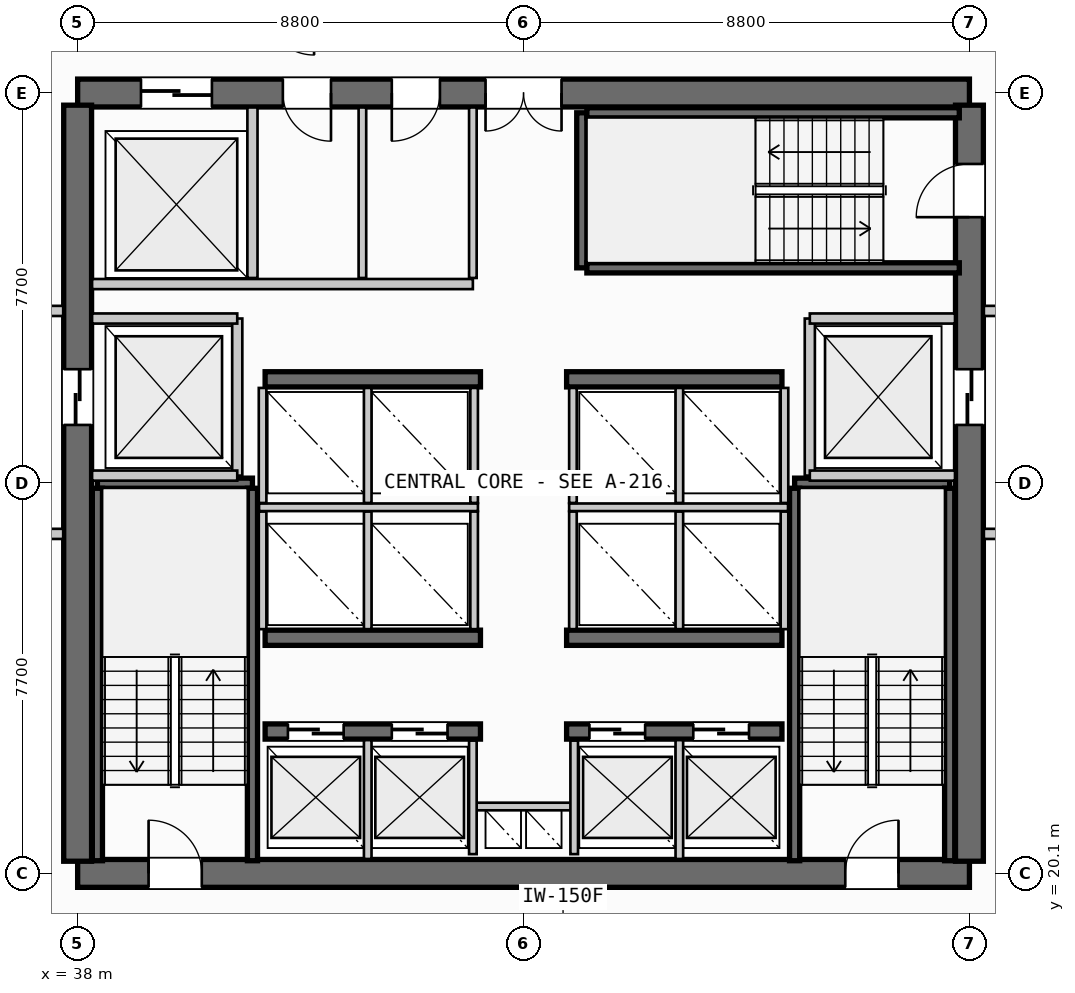
"""IFC4 building model, lengths in metres.
Left out: names, types, materials, properties, quantities, classifications, styles, units other than length and angle.
Written with IfcOpenShell. Run it as: python <this file> out.ifc"""

import sys

from ifc_helpers import new_model, si_unit, direction, frame, frame_2d, origin, place, context, subcontext, project, spatial, rectangle, extrude, source, transform, mapped, element, fill, save


model = new_model("IFC4")
c1 = context("Model", 3, precision=1e-05, world=origin(), true_north=direction((0.0, 1.0)))
c2 = subcontext(c1, "Body", "Model", "MODEL_VIEW")
j1 = project(units=[si_unit("LENGTHUNIT", "METRE"), si_unit("PLANEANGLEUNIT", "RADIAN")], contexts=[c1])
p1 = place(None, origin())
s1 = spatial("IfcSite", under=j1, at=p1, CompositionType="ELEMENT")
p2 = place(p1, origin())
s2 = spatial("IfcBuilding", under=s1, at=p2, CompositionType="ELEMENT")
p3 = place(p2, frame((0.0, 0.0, 114.4)))
s3 = spatial("IfcBuildingStorey", under=s2, at=p3, CompositionType="ELEMENT", Elevation=114.4)
p4 = place(p3, frame((38.0, 20.1, 0.0), z_axis=(0.0, 0.0, 1.0), x_axis=(1.0, 0.0, 0.0)))
e1 = element("IfcWall", 1, at=p4, inside=s3, PredefinedType="SHEAR", context=c2, shape_type="SweptSolid", body=[
    extrude(rectangle(XDim=17.6, YDim=0.55, at=frame_2d((8.8, 0.0))), origin(), (0.0, 0.0, 1.0), 3.35),
])
p5 = place(p4, frame((1.4, 0.0, 0.0)))
e2 = element("IfcOpeningElement", 2, at=p5, cuts=e1, PredefinedType="OPENING", context=c2, shape_type="SweptSolid", body=[
    extrude(rectangle(XDim=1.05, YDim=2.15, at=frame_2d((0.525, 1.075))), frame((0.0, 0.285, 0.0), z_axis=(0.0, -1.0, 0.0), x_axis=(1.0, 0.0, 0.0)), (0.0, 0.0, 1.0), 0.57),
])
p6 = place(p4, frame((15.15, 0.0, 0.0)))
e3 = element("IfcOpeningElement", 3, at=p6, cuts=e1, PredefinedType="OPENING", context=c2, shape_type="SweptSolid", body=[
    extrude(rectangle(XDim=1.05, YDim=2.15, at=frame_2d((0.525, 1.075))), frame((0.0, 0.285, 0.0), z_axis=(0.0, -1.0, 0.0), x_axis=(1.0, 0.0, 0.0)), (0.0, 0.0, 1.0), 0.57),
])
p7 = place(p3, frame((55.6, 35.5, 0.0), z_axis=(0.0, 0.0, 1.0), x_axis=(-1.0, 0.0, 0.0)))
e4 = element("IfcWall", 4, at=p7, inside=s3, PredefinedType="SHEAR", context=c2, shape_type="SweptSolid", body=[
    extrude(rectangle(XDim=17.6, YDim=0.55, at=frame_2d((8.8, 0.0))), origin(), (0.0, 0.0, 1.0), 3.35),
])
p8 = place(p7, frame((8.05, 0.0, 0.0)))
e5 = element("IfcOpeningElement", 5, at=p8, cuts=e4, PredefinedType="OPENING", context=c2, shape_type="SweptSolid", body=[
    extrude(rectangle(XDim=1.5, YDim=2.2, at=frame_2d((0.75, 1.1))), frame((0.0, 0.285, 0.0), z_axis=(0.0, -1.0, 0.0), x_axis=(1.0, 0.0, 0.0)), (0.0, 0.0, 1.0), 0.57),
])
p9 = place(p7, frame((14.95, 0.0, 0.0)))
e6 = element("IfcOpeningElement", 6, at=p9, cuts=e4, PredefinedType="OPENING", context=c2, shape_type="SweptSolid", body=[
    extrude(rectangle(XDim=1.4, YDim=2.3, at=frame_2d((0.7, 1.15))), frame((0.0, 0.285, 0.0), z_axis=(0.0, -1.0, 0.0), x_axis=(1.0, 0.0, 0.0)), (0.0, 0.0, 1.0), 0.57),
])
p10 = place(p7, frame((12.6, 0.0, 0.0)))
e7 = element("IfcOpeningElement", 7, at=p10, cuts=e4, PredefinedType="OPENING", context=c2, shape_type="SweptSolid", body=[
    extrude(rectangle(XDim=0.95, YDim=2.15, at=frame_2d((0.475, 1.075))), frame((0.0, 0.285, 0.0), z_axis=(0.0, -1.0, 0.0), x_axis=(1.0, 0.0, 0.0)), (0.0, 0.0, 1.0), 0.57),
])
p11 = place(p7, frame((10.45, 0.0, 0.0)))
e8 = element("IfcOpeningElement", 8, at=p11, cuts=e4, PredefinedType="OPENING", context=c2, shape_type="SweptSolid", body=[
    extrude(rectangle(XDim=0.95, YDim=2.15, at=frame_2d((0.475, 1.075))), frame((0.0, 0.285, 0.0), z_axis=(0.0, -1.0, 0.0), x_axis=(1.0, 0.0, 0.0)), (0.0, 0.0, 1.0), 0.57),
])
p12 = place(p3, frame((38.0, 35.26, 0.0), z_axis=(0.0, 0.0, 1.0), x_axis=(0.0, -1.0, 0.0)))
e9 = element("IfcWall", 9, at=p12, inside=s3, PredefinedType="SHEAR", context=c2, shape_type="SweptSolid", body=[
    extrude(rectangle(XDim=14.92, YDim=0.55, at=frame_2d((7.46, 0.0))), origin(), (0.0, 0.0, 1.0), 3.35),
])
p13 = place(p12, frame((5.21, 0.0, 0.0)))
e10 = element("IfcOpeningElement", 10, at=p13, cuts=e9, PredefinedType="OPENING", context=c2, shape_type="SweptSolid", body=[
    extrude(rectangle(XDim=1.1, YDim=2.2, at=frame_2d((0.55, 1.1))), frame((0.0, 0.285, 0.0), z_axis=(0.0, -1.0, 0.0), x_axis=(1.0, 0.0, 0.0)), (0.0, 0.0, 1.0), 0.57),
])
p14 = place(p3, frame((55.6, 20.34, 0.0), z_axis=(0.0, 0.0, 1.0), x_axis=(0.0, 1.0, 0.0)))
e11 = element("IfcWall", 11, at=p14, inside=s3, PredefinedType="SHEAR", context=c2, shape_type="SweptSolid", body=[
    extrude(rectangle(XDim=14.92, YDim=0.55, at=frame_2d((7.46, 0.0))), origin(), (0.0, 0.0, 1.0), 3.35),
])
p15 = place(p14, frame((12.71, 0.0, 0.0)))
e12 = element("IfcOpeningElement", 12, at=p15, cuts=e11, PredefinedType="OPENING", context=c2, shape_type="SweptSolid", body=[
    extrude(rectangle(XDim=1.05, YDim=2.15, at=frame_2d((0.525, 1.075))), frame((0.0, 0.285, 0.0), z_axis=(0.0, -1.0, 0.0), x_axis=(1.0, 0.0, 0.0)), (0.0, 0.0, 1.0), 0.57),
])
p16 = place(p14, frame((8.61, 0.0, 0.0)))
e13 = element("IfcOpeningElement", 13, at=p16, cuts=e11, PredefinedType="OPENING", context=c2, shape_type="SweptSolid", body=[
    extrude(rectangle(XDim=1.1, YDim=2.2, at=frame_2d((0.55, 1.1))), frame((0.0, 0.285, 0.0), z_axis=(0.0, -1.0, 0.0), x_axis=(1.0, 0.0, 0.0)), (0.0, 0.0, 1.0), 0.57),
])
p17 = place(p3, frame((41.7, 22.9, 0.0), z_axis=(0.0, 0.0, 1.0), x_axis=(1.0, 0.0, 0.0)))
e14 = element("IfcWall", 14, at=p17, inside=s3, PredefinedType="SHEAR", context=c2, shape_type="SweptSolid", body=[
    extrude(rectangle(XDim=4.25, YDim=0.3, at=frame_2d((2.125, 0.0))), origin(), (0.0, 0.0, 1.0), 3.35),
])
p18 = place(p17, frame((0.45, 0.0, 0.0)))
e15 = element("IfcOpeningElement", 15, at=p18, cuts=e14, PredefinedType="OPENING", context=c2, shape_type="SweptSolid", body=[
    extrude(rectangle(XDim=1.1, YDim=2.2, at=frame_2d((0.55, 1.1))), frame((0.0, 0.16, 0.0), z_axis=(0.0, -1.0, 0.0), x_axis=(1.0, 0.0, 0.0)), (0.0, 0.0, 1.0), 0.32),
])
p19 = place(p17, frame((2.5, 0.0, 0.0)))
e16 = element("IfcOpeningElement", 16, at=p19, cuts=e14, PredefinedType="OPENING", context=c2, shape_type="SweptSolid", body=[
    extrude(rectangle(XDim=1.1, YDim=2.2, at=frame_2d((0.55, 1.1))), frame((0.0, 0.16, 0.0), z_axis=(0.0, -1.0, 0.0), x_axis=(1.0, 0.0, 0.0)), (0.0, 0.0, 1.0), 0.32),
])
p20 = place(p3, frame((47.65, 22.9, 0.0), z_axis=(0.0, 0.0, 1.0), x_axis=(1.0, 0.0, 0.0)))
e17 = element("IfcWall", 17, at=p20, inside=s3, PredefinedType="SHEAR", context=c2, shape_type="SweptSolid", body=[
    extrude(rectangle(XDim=4.25, YDim=0.3, at=frame_2d((2.125, 0.0))), origin(), (0.0, 0.0, 1.0), 3.35),
])
p21 = place(p20, frame((0.45, 0.0, 0.0)))
e18 = element("IfcOpeningElement", 18, at=p21, cuts=e17, PredefinedType="OPENING", context=c2, shape_type="SweptSolid", body=[
    extrude(rectangle(XDim=1.1, YDim=2.2, at=frame_2d((0.55, 1.1))), frame((0.0, 0.16, 0.0), z_axis=(0.0, -1.0, 0.0), x_axis=(1.0, 0.0, 0.0)), (0.0, 0.0, 1.0), 0.32),
])
p22 = place(p20, frame((2.5, 0.0, 0.0)))
e19 = element("IfcOpeningElement", 19, at=p22, cuts=e17, PredefinedType="OPENING", context=c2, shape_type="SweptSolid", body=[
    extrude(rectangle(XDim=1.1, YDim=2.2, at=frame_2d((0.55, 1.1))), frame((0.0, 0.16, 0.0), z_axis=(0.0, -1.0, 0.0), x_axis=(1.0, 0.0, 0.0)), (0.0, 0.0, 1.0), 0.32),
])
for number, where, z_axis, x_axis in (
    (20, (41.7, 24.75, 0.0), (0.0, 0.0, 1.0), (1.0, 0.0, 0.0)),
    (21, (47.65, 24.75, 0.0), (0.0, 0.0, 1.0), (1.0, 0.0, 0.0)),
    (22, (41.7, 29.85, 0.0), (0.0, 0.0, 1.0), (1.0, 0.0, 0.0)),
    (23, (47.65, 29.85, 0.0), (0.0, 0.0, 1.0), (1.0, 0.0, 0.0)),
):
    element("IfcWall", number, at=place(p3, frame(where, z_axis=z_axis, x_axis=x_axis)), inside=s3, PredefinedType="SHEAR", context=c2, shape_type="SweptSolid", body=[
        extrude(rectangle(XDim=4.25, YDim=0.3, at=frame_2d((2.125, 0.0))), origin(), (0.0, 0.0, 1.0), 3.35),
    ])
p23 = place(p3, frame((38.39, 27.8, 0.0), z_axis=(0.0, 0.0, 1.0), x_axis=(1.0, 0.0, 0.0)))
e24 = element("IfcWall", 24, at=p23, inside=s3, PredefinedType="SHEAR", context=c2, shape_type="SweptSolid", body=[
    extrude(rectangle(XDim=3.06, YDim=0.2, at=frame_2d((1.53, 0.0))), origin(), (0.0, 0.0, 1.0), 3.35),
])
for number, where, z_axis, x_axis in (
    (25, (41.45, 27.7, 0.0), (0.0, 0.0, 1.0), (0.0, -1.0, 0.0)),
    (26, (38.39, 20.35, 0.0), (0.0, 0.0, 1.0), (0.0, 1.0, 0.0)),
):
    element("IfcWall", number, at=place(p3, frame(where, z_axis=z_axis, x_axis=x_axis)), inside=s3, PredefinedType="SHEAR", context=c2, shape_type="SweptSolid", body=[
        extrude(rectangle(XDim=7.35, YDim=0.2, at=frame_2d((3.675, 0.0))), origin(), (0.0, 0.0, 1.0), 3.35),
    ])
p24 = place(p3, frame((52.15, 27.8, 0.0), z_axis=(0.0, 0.0, 1.0), x_axis=(1.0, 0.0, 0.0)))
e27 = element("IfcWall", 27, at=p24, inside=s3, PredefinedType="SHEAR", context=c2, shape_type="SweptSolid", body=[
    extrude(rectangle(XDim=3.06, YDim=0.2, at=frame_2d((1.53, 0.0))), origin(), (0.0, 0.0, 1.0), 3.35),
])
for number, where, z_axis, x_axis in (
    (28, (55.21, 27.7, 0.0), (0.0, 0.0, 1.0), (0.0, -1.0, 0.0)),
    (29, (52.15, 20.35, 0.0), (0.0, 0.0, 1.0), (0.0, 1.0, 0.0)),
):
    element("IfcWall", number, at=place(p3, frame(where, z_axis=z_axis, x_axis=x_axis)), inside=s3, PredefinedType="SHEAR", context=c2, shape_type="SweptSolid", body=[
        extrude(rectangle(XDim=7.35, YDim=0.2, at=frame_2d((3.675, 0.0))), origin(), (0.0, 0.0, 1.0), 3.35),
    ])
p25 = place(p3, frame((47.95, 32.05, 0.0), z_axis=(0.0, 0.0, 1.0), x_axis=(0.0, 1.0, 0.0)))
e30 = element("IfcWall", 30, at=p25, inside=s3, PredefinedType="SHEAR", context=c2, shape_type="SweptSolid", body=[
    extrude(rectangle(XDim=3.06, YDim=0.2, at=frame_2d((1.53, 0.0))), origin(), (0.0, 0.0, 1.0), 3.35),
])
for number, where, z_axis, x_axis in (
    (31, (48.05, 35.11, 0.0), (0.0, 0.0, 1.0), (1.0, 0.0, 0.0)),
    (32, (55.4, 32.05, 0.0), (0.0, 0.0, 1.0), (-1.0, 0.0, 0.0)),
):
    element("IfcWall", number, at=place(p3, frame(where, z_axis=z_axis, x_axis=x_axis)), inside=s3, PredefinedType="SHEAR", context=c2, shape_type="SweptSolid", body=[
        extrude(rectangle(XDim=7.35, YDim=0.2, at=frame_2d((3.675, 0.0))), origin(), (0.0, 0.0, 1.0), 3.35),
    ])
p26 = place(p3, frame((45.8, 21.42, 0.0), z_axis=(0.0, 0.0, 1.0), x_axis=(1.0, 0.0, 0.0)))
e33 = element("IfcWall", 33, at=p26, inside=s3, PredefinedType="PARTITIONING", context=c2, shape_type="SweptSolid", body=[
    extrude(rectangle(XDim=2.0, YDim=0.15, at=frame_2d((1.0, 0.0))), origin(), (0.0, 0.0, 1.0), 2.28),
])
for number, where, z_axis, x_axis in (
    (34, (45.8, 20.48, 0.0), (0.0, 0.0, 1.0), (0.0, 1.0, 0.0)),
    (35, (47.8, 20.48, 0.0), (0.0, 0.0, 1.0), (0.0, 1.0, 0.0)),
):
    element("IfcWall", number, at=place(p3, frame(where, z_axis=z_axis, x_axis=x_axis)), inside=s3, PredefinedType="PARTITIONING", context=c2, shape_type="SweptSolid", body=[
        extrude(rectangle(XDim=2.24, YDim=0.15, at=frame_2d((1.12, 0.0))), origin(), (0.0, 0.0, 1.0), 2.28),
    ])
p27 = place(p3, frame((41.15, 27.95, 0.0), z_axis=(0.0, 0.0, 1.0), x_axis=(0.0, 1.0, 0.0)))
e36 = element("IfcWall", 36, at=p27, inside=s3, PredefinedType="PARTITIONING", context=c2, shape_type="SweptSolid", body=[
    extrude(rectangle(XDim=3.1, YDim=0.2, at=frame_2d((1.55, 0.0))), origin(), (0.0, 0.0, 1.0), 2.28),
])
for number, where, z_axis, x_axis in (
    (37, (38.285, 27.95, 0.0), (0.0, 0.0, 1.0), (1.0, 0.0, 0.0)),
    (38, (38.285, 31.05, 0.0), (0.0, 0.0, 1.0), (1.0, 0.0, 0.0)),
):
    element("IfcWall", number, at=place(p3, frame(where, z_axis=z_axis, x_axis=x_axis)), inside=s3, PredefinedType="PARTITIONING", context=c2, shape_type="SweptSolid", body=[
        extrude(rectangle(XDim=2.865, YDim=0.2, at=frame_2d((1.433, 0.0))), origin(), (0.0, 0.0, 1.0), 2.28),
    ])
for number, where, z_axis, x_axis in (
    (39, (34.5, 26.8, 0.0), (0.0, 0.0, 1.0), (1.0, 0.0, 0.0)),
    (40, (34.5, 31.2, 0.0), (0.0, 0.0, 1.0), (1.0, 0.0, 0.0)),
):
    element("IfcWall", number, at=place(p3, frame(where, z_axis=z_axis, x_axis=x_axis)), inside=s3, PredefinedType="PARTITIONING", context=c2, shape_type="SweptSolid", body=[
        extrude(rectangle(XDim=3.215, YDim=0.2, at=frame_2d((1.607, 0.0))), origin(), (0.0, 0.0, 1.0), 2.28),
    ])
p28 = place(p3, frame((52.45, 27.95, 0.0), z_axis=(0.0, 0.0, 1.0), x_axis=(0.0, 1.0, 0.0)))
e41 = element("IfcWall", 41, at=p28, inside=s3, PredefinedType="PARTITIONING", context=c2, shape_type="SweptSolid", body=[
    extrude(rectangle(XDim=3.1, YDim=0.2, at=frame_2d((1.55, 0.0))), origin(), (0.0, 0.0, 1.0), 2.28),
])
for number, where, z_axis, x_axis in (
    (42, (52.45, 27.95, 0.0), (0.0, 0.0, 1.0), (1.0, 0.0, 0.0)),
    (43, (52.45, 31.05, 0.0), (0.0, 0.0, 1.0), (1.0, 0.0, 0.0)),
):
    element("IfcWall", number, at=place(p3, frame(where, z_axis=z_axis, x_axis=x_axis)), inside=s3, PredefinedType="PARTITIONING", context=c2, shape_type="SweptSolid", body=[
        extrude(rectangle(XDim=2.865, YDim=0.2, at=frame_2d((1.433, 0.0))), origin(), (0.0, 0.0, 1.0), 2.28),
    ])
for number, where, z_axis, x_axis in (
    (44, (55.885, 26.8, 0.0), (0.0, 0.0, 1.0), (1.0, 0.0, 0.0)),
    (45, (55.885, 31.2, 0.0), (0.0, 0.0, 1.0), (1.0, 0.0, 0.0)),
):
    element("IfcWall", number, at=place(p3, frame(where, z_axis=z_axis, x_axis=x_axis)), inside=s3, PredefinedType="PARTITIONING", context=c2, shape_type="SweptSolid", body=[
        extrude(rectangle(XDim=3.215, YDim=0.2, at=frame_2d((1.607, 0.0))), origin(), (0.0, 0.0, 1.0), 2.28),
    ])
for number, where, z_axis, x_axis in (
    (46, (43.725, 20.385, 0.0), (0.0, 0.0, 1.0), (0.0, 1.0, 0.0)),
    (47, (49.875, 20.385, 0.0), (0.0, 0.0, 1.0), (0.0, 1.0, 0.0)),
):
    element("IfcWall", number, at=place(p3, frame(where, z_axis=z_axis, x_axis=x_axis)), inside=s3, PredefinedType="PARTITIONING", context=c2, shape_type="SweptSolid", body=[
        extrude(rectangle(XDim=2.345, YDim=0.15, at=frame_2d((1.172, 0.0))), origin(), (0.0, 0.0, 1.0), 2.28),
    ])
p29 = place(p3, frame((41.58, 27.325, 0.0), z_axis=(0.0, 0.0, 1.0), x_axis=(1.0, 0.0, 0.0)))
e48 = element("IfcWall", 48, at=p29, inside=s3, PredefinedType="PARTITIONING", context=c2, shape_type="SweptSolid", body=[
    extrude(rectangle(XDim=4.32, YDim=0.15, at=frame_2d((2.16, 0.0))), origin(), (0.0, 0.0, 1.0), 2.28),
])
p30 = place(p3, frame((47.7, 27.325, 0.0), z_axis=(0.0, 0.0, 1.0), x_axis=(1.0, 0.0, 0.0)))
e49 = element("IfcWall", 49, at=p30, inside=s3, PredefinedType="PARTITIONING", context=c2, shape_type="SweptSolid", body=[
    extrude(rectangle(XDim=4.32, YDim=0.15, at=frame_2d((2.16, 0.0))), origin(), (0.0, 0.0, 1.0), 2.28),
])
for number, where, z_axis, x_axis in (
    (50, (41.65, 24.92, 0.0), (0.0, 0.0, 1.0), (0.0, 1.0, 0.0)),
    (51, (43.725, 24.92, 0.0), (0.0, 0.0, 1.0), (0.0, 1.0, 0.0)),
    (52, (45.825, 24.92, 0.0), (0.0, 0.0, 1.0), (0.0, 1.0, 0.0)),
    (53, (47.775, 24.92, 0.0), (0.0, 0.0, 1.0), (0.0, 1.0, 0.0)),
    (54, (49.875, 24.92, 0.0), (0.0, 0.0, 1.0), (0.0, 1.0, 0.0)),
    (55, (51.95, 24.92, 0.0), (0.0, 0.0, 1.0), (0.0, 1.0, 0.0)),
):
    element("IfcWall", number, at=place(p3, frame(where, z_axis=z_axis, x_axis=x_axis)), inside=s3, PredefinedType="PARTITIONING", context=c2, shape_type="SweptSolid", body=[
        extrude(rectangle(XDim=2.32, YDim=0.15, at=frame_2d((1.16, 0.0))), origin(), (0.0, 0.0, 1.0), 2.28),
    ])
for number, where, z_axis, x_axis in (
    (56, (41.65, 27.41, 0.0), (0.0, 0.0, 1.0), (0.0, 1.0, 0.0)),
    (57, (43.725, 27.41, 0.0), (0.0, 0.0, 1.0), (0.0, 1.0, 0.0)),
    (58, (45.825, 27.41, 0.0), (0.0, 0.0, 1.0), (0.0, 1.0, 0.0)),
    (59, (47.775, 27.41, 0.0), (0.0, 0.0, 1.0), (0.0, 1.0, 0.0)),
    (60, (49.875, 27.41, 0.0), (0.0, 0.0, 1.0), (0.0, 1.0, 0.0)),
    (61, (51.95, 27.41, 0.0), (0.0, 0.0, 1.0), (0.0, 1.0, 0.0)),
):
    element("IfcWall", number, at=place(p3, frame(where, z_axis=z_axis, x_axis=x_axis)), inside=s3, PredefinedType="PARTITIONING", context=c2, shape_type="SweptSolid", body=[
        extrude(rectangle(XDim=2.27, YDim=0.15, at=frame_2d((1.135, 0.0))), origin(), (0.0, 0.0, 1.0), 2.28),
    ])
p31 = place(p3, frame((41.45, 31.85, 0.0), z_axis=(0.0, 0.0, 1.0), x_axis=(0.0, 1.0, 0.0)))
e62 = element("IfcWall", 62, at=p31, inside=s3, PredefinedType="PARTITIONING", context=c2, shape_type="SweptSolid", body=[
    extrude(rectangle(XDim=3.365, YDim=0.2, at=frame_2d((1.683, 0.0))), origin(), (0.0, 0.0, 1.0), 2.28),
])
p32 = place(p3, frame((38.285, 31.73, 0.0), z_axis=(0.0, 0.0, 1.0), x_axis=(1.0, 0.0, 0.0)))
e63 = element("IfcWall", 63, at=p32, inside=s3, PredefinedType="PARTITIONING", context=c2, shape_type="SweptSolid", body=[
    extrude(rectangle(XDim=7.515, YDim=0.2, at=frame_2d((3.758, 0.0))), origin(), (0.0, 0.0, 1.0), 2.28),
])
p33 = place(p3, frame((45.8, 31.85, 0.0), z_axis=(0.0, 0.0, 1.0), x_axis=(0.0, 1.0, 0.0)))
e64 = element("IfcWall", 64, at=p33, inside=s3, PredefinedType="PARTITIONING", context=c2, shape_type="SweptSolid", body=[
    extrude(rectangle(XDim=3.365, YDim=0.15, at=frame_2d((1.683, 0.0))), origin(), (0.0, 0.0, 1.0), 2.28),
])
p34 = place(p3, frame((43.62, 31.85, 0.0), z_axis=(0.0, 0.0, 1.0), x_axis=(0.0, 1.0, 0.0)))
e65 = element("IfcWall", 65, at=p34, inside=s3, PredefinedType="PLUMBINGWALL", context=c2, shape_type="SweptSolid", body=[
    extrude(rectangle(XDim=3.365, YDim=0.15, at=frame_2d((1.683, 0.0))), origin(), (0.0, 0.0, 1.0), 2.28),
])
m1 = source(origin(), c2, "Body", "SweptSolid", [
    extrude(rectangle(XDim=1.05, YDim=2.15, at=frame_2d((0.525, 1.075))), frame((0.0, 0.025, 0.0), z_axis=(0.0, -1.0, 0.0), x_axis=(1.0, 0.0, 0.0)), (0.0, 0.0, 1.0), 0.05),
])
p35 = place(p5, origin())
e66 = element("IfcDoor", 66, at=p35, inside=s3, OperationType="SINGLE_SWING_LEFT", PredefinedType="DOOR", context=c2, shape_type="MappedRepresentation", body=[
    mapped(m1, transform((0.0, 0.0, 0.0), scale=1.0)),
])
fill(e2, e66)
p36 = place(p6, origin())
e67 = element("IfcDoor", 67, at=p36, inside=s3, OperationType="SINGLE_SWING_RIGHT", PredefinedType="DOOR", context=c2, shape_type="MappedRepresentation", body=[
    mapped(m1, transform((0.0, 0.0, 0.0), scale=1.0)),
])
fill(e3, e67)
p37 = place(p15, origin())
e68 = element("IfcDoor", 68, at=p37, inside=s3, OperationType="SINGLE_SWING_LEFT", PredefinedType="DOOR", context=c2, shape_type="MappedRepresentation", body=[
    mapped(m1, transform((0.0, 0.0, 0.0), scale=1.0)),
])
fill(e12, e68)
m2 = source(origin(), c2, "Body", "SweptSolid", [
    extrude(rectangle(XDim=1.5, YDim=2.2, at=frame_2d((0.75, 1.1))), frame((0.0, 0.025, 0.0), z_axis=(0.0, -1.0, 0.0), x_axis=(1.0, 0.0, 0.0)), (0.0, 0.0, 1.0), 0.05),
])
p38 = place(p8, origin())
e69 = element("IfcDoor", 69, at=p38, inside=s3, OperationType="DOUBLE_DOOR_SINGLE_SWING", PredefinedType="DOOR", context=c2, shape_type="MappedRepresentation", body=[
    mapped(m2, transform((0.0, 0.0, 0.0), scale=1.0)),
])
fill(e5, e69)
m3 = source(origin(), c2, "Body", "SweptSolid", [
    extrude(rectangle(XDim=1.1, YDim=2.2, at=frame_2d((0.55, 1.1))), frame((0.0, 0.025, 0.0), z_axis=(0.0, -1.0, 0.0), x_axis=(1.0, 0.0, 0.0)), (0.0, 0.0, 1.0), 0.05),
])
p39 = place(p13, origin())
e70 = element("IfcDoor", 70, at=p39, inside=s3, OperationType="SLIDING_TO_LEFT", PredefinedType="DOOR", context=c2, shape_type="MappedRepresentation", body=[
    mapped(m3, transform((0.0, 0.0, 0.0), scale=1.0)),
])
fill(e10, e70)
p40 = place(p16, origin())
e71 = element("IfcDoor", 71, at=p40, inside=s3, OperationType="SLIDING_TO_RIGHT", PredefinedType="DOOR", context=c2, shape_type="MappedRepresentation", body=[
    mapped(m3, transform((0.0, 0.0, 0.0), scale=1.0)),
])
fill(e13, e71)
p41 = place(p18, origin())
e72 = element("IfcDoor", 72, at=p41, inside=s3, OperationType="SLIDING_TO_LEFT", PredefinedType="DOOR", context=c2, shape_type="MappedRepresentation", body=[
    mapped(m3, transform((0.0, 0.0, 0.0), scale=1.0)),
])
fill(e15, e72)
p42 = place(p19, origin())
e73 = element("IfcDoor", 73, at=p42, inside=s3, OperationType="SLIDING_TO_LEFT", PredefinedType="DOOR", context=c2, shape_type="MappedRepresentation", body=[
    mapped(m3, transform((0.0, 0.0, 0.0), scale=1.0)),
])
fill(e16, e73)
p43 = place(p21, origin())
e74 = element("IfcDoor", 74, at=p43, inside=s3, OperationType="SLIDING_TO_LEFT", PredefinedType="DOOR", context=c2, shape_type="MappedRepresentation", body=[
    mapped(m3, transform((0.0, 0.0, 0.0), scale=1.0)),
])
fill(e18, e74)
p44 = place(p22, origin())
e75 = element("IfcDoor", 75, at=p44, inside=s3, OperationType="SLIDING_TO_LEFT", PredefinedType="DOOR", context=c2, shape_type="MappedRepresentation", body=[
    mapped(m3, transform((0.0, 0.0, 0.0), scale=1.0)),
])
fill(e19, e75)
m4 = source(origin(), c2, "Body", "SweptSolid", [
    extrude(rectangle(XDim=1.4, YDim=2.3, at=frame_2d((0.7, 1.15))), frame((0.0, 0.025, 0.0), z_axis=(0.0, -1.0, 0.0), x_axis=(1.0, 0.0, 0.0)), (0.0, 0.0, 1.0), 0.05),
])
p45 = place(p9, origin())
e76 = element("IfcDoor", 76, at=p45, inside=s3, OperationType="SLIDING_TO_RIGHT", PredefinedType="DOOR", context=c2, shape_type="MappedRepresentation", body=[
    mapped(m4, transform((0.0, 0.0, 0.0), scale=1.0)),
])
fill(e6, e76)
m5 = source(origin(), c2, "Body", "SweptSolid", [
    extrude(rectangle(XDim=0.95, YDim=2.15, at=frame_2d((0.475, 1.075))), frame((0.0, 0.025, 0.0), z_axis=(0.0, -1.0, 0.0), x_axis=(1.0, 0.0, 0.0)), (0.0, 0.0, 1.0), 0.05),
])
p46 = place(p10, origin())
e77 = element("IfcDoor", 77, at=p46, inside=s3, OperationType="SINGLE_SWING_LEFT", PredefinedType="DOOR", context=c2, shape_type="MappedRepresentation", body=[
    mapped(m5, transform((0.0, 0.0, 0.0), scale=1.0)),
])
fill(e7, e77)
p47 = place(p11, origin())
e78 = element("IfcDoor", 78, at=p47, inside=s3, OperationType="SINGLE_SWING_RIGHT", PredefinedType="DOOR", context=c2, shape_type="MappedRepresentation", body=[
    mapped(m5, transform((0.0, 0.0, 0.0), scale=1.0)),
])
fill(e8, e78)
save(model, sys.argv[1])
